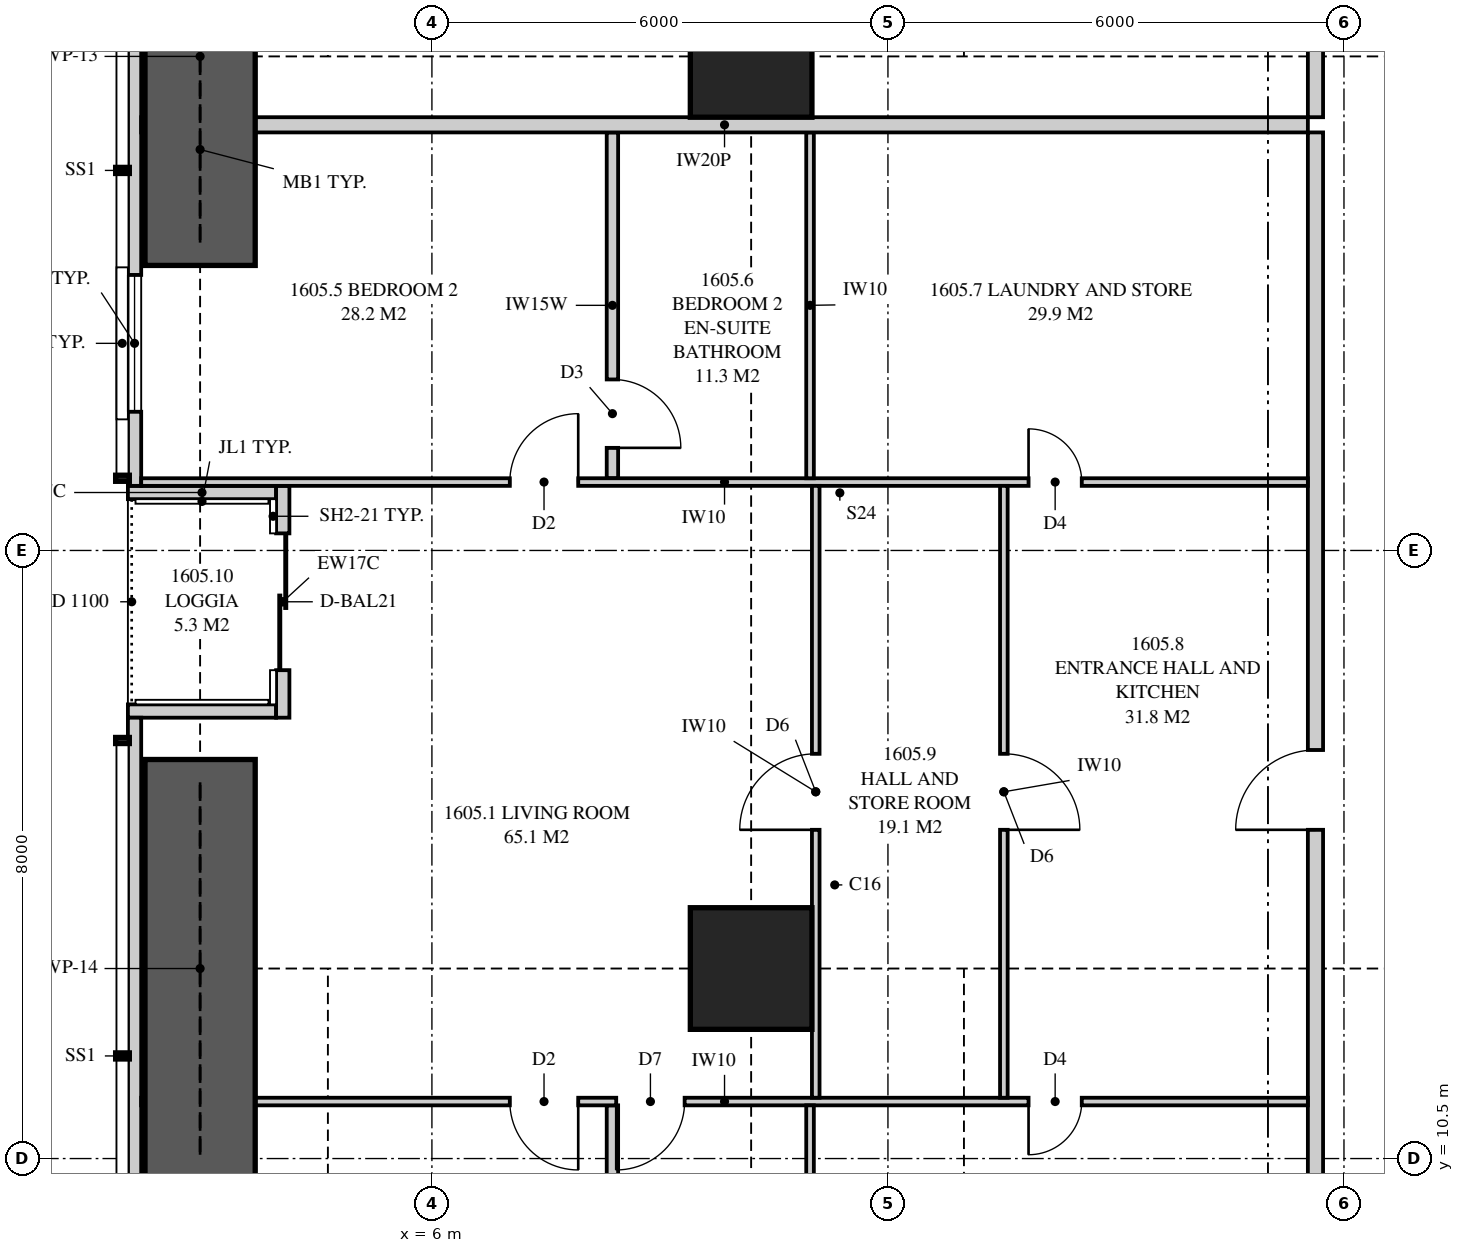
"""IFC4 building model, lengths in metres.
Left out: names, types, materials, properties, quantities, classifications, styles, units other than length and angle.
Written with IfcOpenShell. Run it as: python <this file> out.ifc"""

import sys

from ifc_helpers import new_model, si_unit, direction, frame, frame_2d, origin, origin_2d, place, context, subcontext, project, spatial, polyline, rectangle, outline, extrude, element, fill, save


model = new_model("IFC4")
c1 = context("Model", 3, precision=1e-05, world=origin(), true_north=direction((0.0, 1.0)))
c2 = subcontext(c1, "Body", "Model", "MODEL_VIEW")
j1 = project(units=[si_unit("LENGTHUNIT", "METRE"), si_unit("PLANEANGLEUNIT", "RADIAN")], contexts=[c1])
p1 = place(None, origin())
s1 = spatial("IfcSite", under=j1, at=p1, CompositionType="ELEMENT")
p2 = place(p1, origin())
s2 = spatial("IfcBuilding", under=s1, at=p2, CompositionType="ELEMENT")
p3 = place(p2, frame((0.0, 0.0, 61.2)))
s3 = spatial("IfcBuildingStorey", under=s2, at=p3, CompositionType="ELEMENT", Elevation=61.2)
for number, where, z_axis, x_axis in (
    (1, (10.2, 13.0, 0.0), (0.0, 0.0, 1.0), (1.0, 0.0, 0.0)),
    (2, (10.2, 25.0, 0.0), (0.0, 0.0, 1.0), (1.0, 0.0, 0.0)),
):
    element("IfcColumn", number, at=place(p3, frame(where, z_axis=z_axis, x_axis=x_axis)), inside=s3, PredefinedType="COLUMN", context=c2, shape_type="SweptSolid", body=[
        extrude(rectangle(XDim=1.6, YDim=1.6, at=origin_2d()), origin(), (0.0, 0.0, 1.0), 3.35),
    ])
p4 = place(p3, frame((2.087, 34.949, 0.0), z_axis=(0.0, 0.0, 1.0), x_axis=(0.0, -1.0, 0.0)))
e3 = element("IfcWall", 3, at=p4, inside=s3, PredefinedType="SOLIDWALL", context=c2, shape_type="SweptSolid", body=[
    extrude(outline(polyline([(0.0, 0.0), (15.599, 0.0), (15.599, 2.15), (9.949, 2.15), (9.949, 3.11), (9.823, 3.11), (9.823, 2.15), (9.73, 2.15), (9.73, 3.11), (0.0, 3.11), (0.0, 0.0)])), frame((0.0, 0.087, 0.0), z_axis=(0.0, -1.0, 0.0), x_axis=(1.0, 0.0, 0.0)), (0.0, 0.0, 1.0), 0.175),
])
p5 = place(p4, frame((2.722, 0.0, 0.4)))
e4 = element("IfcOpeningElement", 4, at=p5, cuts=e3, PredefinedType="OPENING", context=c2, shape_type="SweptSolid", body=[
    extrude(rectangle(XDim=1.8, YDim=1.7, at=frame_2d((0.9, 0.85))), frame((0.0, 0.097, 0.0), z_axis=(0.0, -1.0, 0.0), x_axis=(1.0, 0.0, 0.0)), (0.0, 0.0, 1.0), 0.195),
])
p6 = place(p4, frame((5.899, 0.0, 0.4)))
e5 = element("IfcOpeningElement", 5, at=p6, cuts=e3, PredefinedType="OPENING", context=c2, shape_type="SweptSolid", body=[
    extrude(rectangle(XDim=1.2, YDim=1.7, at=frame_2d((0.6, 0.85))), frame((0.0, 0.097, 0.0), z_axis=(0.0, -1.0, 0.0), x_axis=(1.0, 0.0, 0.0)), (0.0, 0.0, 1.0), 0.195),
])
p7 = place(p4, frame((12.824, 0.0, 0.4)))
e6 = element("IfcOpeningElement", 6, at=p7, cuts=e3, PredefinedType="OPENING", context=c2, shape_type="SweptSolid", body=[
    extrude(rectangle(XDim=1.8, YDim=1.7, at=frame_2d((0.9, 0.85))), frame((0.0, 0.097, 0.0), z_axis=(0.0, -1.0, 0.0), x_axis=(1.0, 0.0, 0.0)), (0.0, 0.0, 1.0), 0.195),
])
p8 = place(p3, frame((2.087, 16.3, 0.0), z_axis=(0.0, 0.0, 1.0), x_axis=(0.0, -1.0, 0.0)))
e7 = element("IfcWall", 7, at=p8, inside=s3, PredefinedType="SOLIDWALL", context=c2, shape_type="SweptSolid", body=[
    extrude(outline(polyline([(0.0, 0.0), (13.249, 0.0), (13.249, 3.11), (3.519, 3.11), (3.519, 2.15), (3.426, 2.15), (3.426, 3.11), (3.3, 3.11), (3.3, 2.15), (0.0, 2.15), (0.0, 0.0)])), frame((0.0, 0.087, 0.0), z_axis=(0.0, -1.0, 0.0), x_axis=(1.0, 0.0, 0.0)), (0.0, 0.0, 1.0), 0.175),
])
p9 = place(p8, frame((6.175, 0.0, 0.4)))
e8 = element("IfcOpeningElement", 8, at=p9, cuts=e7, PredefinedType="OPENING", context=c2, shape_type="SweptSolid", body=[
    extrude(rectangle(XDim=1.8, YDim=1.7, at=frame_2d((0.9, 0.85))), frame((0.0, 0.097, 0.0), z_axis=(0.0, -1.0, 0.0), x_axis=(1.0, 0.0, 0.0)), (0.0, 0.0, 1.0), 0.195),
])
p10 = place(p8, frame((9.227, 0.0, 0.4)))
e9 = element("IfcOpeningElement", 9, at=p10, cuts=e7, PredefinedType="OPENING", context=c2, shape_type="SweptSolid", body=[
    extrude(rectangle(XDim=1.8, YDim=1.7, at=frame_2d((0.9, 0.85))), frame((0.0, 0.097, 0.0), z_axis=(0.0, -1.0, 0.0), x_axis=(1.0, 0.0, 0.0)), (0.0, 0.0, 1.0), 0.195),
])
p11 = place(p3, frame((4.038, 19.35, 0.0), z_axis=(0.0, 0.0, 1.0), x_axis=(0.0, -1.0, 0.0)))
e10 = element("IfcWall", 10, at=p11, inside=s3, PredefinedType="SOLIDWALL", context=c2, shape_type="SweptSolid", body=[
    extrude(rectangle(XDim=3.05, YDim=0.175, at=frame_2d((1.525, 0.0))), origin(), (0.0, 0.0, 1.0), 3.11),
])
p12 = place(p11, frame((0.625, 0.0, 0.0)))
e11 = element("IfcOpeningElement", 11, at=p12, cuts=e10, PredefinedType="OPENING", context=c2, shape_type="SweptSolid", body=[
    extrude(rectangle(XDim=1.8, YDim=2.1, at=frame_2d((0.9, 1.05))), frame((0.0, 0.097, 0.0), z_axis=(0.0, -1.0, 0.0), x_axis=(1.0, 0.0, 0.0)), (0.0, 0.0, 1.0), 0.195),
])
for number, where, z_axis, x_axis in (
    (12, (2.0, 19.262, 0.0), (0.0, 0.0, 1.0), (1.0, 0.0, 0.0)),
    (13, (2.0, 16.387, 0.0), (0.0, 0.0, 1.0), (1.0, 0.0, 0.0)),
):
    element("IfcWall", number, at=place(p3, frame(where, z_axis=z_axis, x_axis=x_axis)), inside=s3, PredefinedType="SOLIDWALL", context=c2, shape_type="SweptSolid", body=[
        extrude(outline(polyline([(0.0, 0.0), (1.95, 0.0), (1.95, 3.11), (1.75, 3.11), (1.75, 2.15), (0.15, 2.15), (0.15, 3.11), (0.0, 3.11), (0.0, 0.0)])), frame((0.0, 0.087, 0.0), z_axis=(0.0, -1.0, 0.0), x_axis=(1.0, 0.0, 0.0)), (0.0, 0.0, 1.0), 0.175),
    ])
p13 = place(p3, frame((2.175, 24.1, 0.0), z_axis=(0.0, 0.0, 1.0), x_axis=(1.0, 0.0, 0.0)))
e14 = element("IfcWall", 14, at=p13, inside=s3, PredefinedType="PARTITIONING", context=c2, shape_type="SweptSolid", body=[
    extrude(outline(polyline([(0.529, 2.15), (0.0, 2.15), (0.0, 0.0), (0.529, 0.0), (0.529, 0.889), (1.021, 0.889), (1.021, 0.0), (15.35, 0.0), (15.35, 3.11), (9.335, 3.11), (9.335, 2.51), (6.715, 2.51), (6.715, 3.11), (1.685, 3.11), (1.685, 2.15), (1.021, 2.15), (1.021, 1.261), (0.529, 1.261), (0.529, 2.15)])), frame((0.0, 0.1, 0.0), z_axis=(0.0, -1.0, 0.0), x_axis=(1.0, 0.0, 0.0)), (0.0, 0.0, 1.0), 0.2),
])
p14 = place(p3, frame((17.625, 7.75, 0.0), z_axis=(0.0, 0.0, 1.0), x_axis=(0.0, 1.0, 0.0)))
e15 = element("IfcWall", 15, at=p14, inside=s3, PredefinedType="PARTITIONING", context=c2, shape_type="SweptSolid", body=[
    extrude(outline(polyline([(0.0, 0.0), (16.25, 0.0), (16.25, 3.11), (5.587, 3.11), (5.587, 2.541), (4.913, 2.541), (4.913, 3.11), (0.0, 3.11), (0.0, 0.0)])), frame((0.0, 0.1, 0.0), z_axis=(0.0, -1.0, 0.0), x_axis=(1.0, 0.0, 0.0)), (0.0, 0.0, 1.0), 0.2),
])
p15 = place(p14, frame((7.075, 0.0, 0.0)))
e16 = element("IfcOpeningElement", 16, at=p15, cuts=e15, PredefinedType="OPENING", context=c2, shape_type="SweptSolid", body=[
    extrude(rectangle(XDim=1.05, YDim=2.2, at=frame_2d((0.525, 1.1))), frame((0.0, 0.11, 0.0), z_axis=(0.0, -1.0, 0.0), x_axis=(1.0, 0.0, 0.0)), (0.0, 0.0, 1.0), 0.22),
])
p16 = place(p3, frame((2.175, 11.25, 0.0), z_axis=(0.0, 0.0, 1.0), x_axis=(1.0, 0.0, 0.0)))
e17 = element("IfcWall", 17, at=p16, inside=s3, PredefinedType="PARTITIONING", context=c2, shape_type="SweptSolid", body=[
    extrude(outline(polyline([(0.188, 3.11), (0.0, 3.11), (0.0, 0.0), (0.529, 0.0), (0.529, 0.273), (1.021, 0.273), (1.021, 0.0), (15.35, 0.0), (15.35, 3.11), (11.112, 3.11), (11.112, 2.541), (10.538, 2.541), (10.538, 3.11), (9.285, 3.11), (9.285, 2.51), (6.765, 2.51), (6.765, 3.11), (2.744, 3.11), (2.744, 2.541), (2.169, 2.541), (2.169, 3.11), (1.93, 3.11), (1.93, 2.15), (1.021, 2.15), (1.021, 1.876), (0.529, 1.876), (0.529, 2.15), (0.188, 2.15), (0.188, 3.11)])), frame((0.0, 0.05, 0.0), z_axis=(0.0, -1.0, 0.0), x_axis=(1.0, 0.0, 0.0)), (0.0, 0.0, 1.0), 0.1),
])
p17 = place(p16, frame((4.85, 0.0, 0.0)))
e18 = element("IfcOpeningElement", 18, at=p17, cuts=e17, PredefinedType="OPENING", context=c2, shape_type="SweptSolid", body=[
    extrude(rectangle(XDim=0.9, YDim=2.1, at=frame_2d((0.45, 1.05))), frame((0.0, 0.06, 0.0), z_axis=(0.0, -1.0, 0.0), x_axis=(1.0, 0.0, 0.0)), (0.0, 0.0, 1.0), 0.12),
])
p18 = place(p16, frame((6.25, 0.0, 0.0)))
e19 = element("IfcOpeningElement", 19, at=p18, cuts=e17, PredefinedType="OPENING", context=c2, shape_type="SweptSolid", body=[
    extrude(rectangle(XDim=0.9, YDim=2.1, at=frame_2d((0.45, 1.05))), frame((0.0, 0.06, 0.0), z_axis=(0.0, -1.0, 0.0), x_axis=(1.0, 0.0, 0.0)), (0.0, 0.0, 1.0), 0.12),
])
p19 = place(p16, frame((11.675, 0.0, 0.0)))
e20 = element("IfcOpeningElement", 20, at=p19, cuts=e17, PredefinedType="OPENING", context=c2, shape_type="SweptSolid", body=[
    extrude(rectangle(XDim=0.7, YDim=2.1, at=frame_2d((0.35, 1.05))), frame((0.0, 0.06, 0.0), z_axis=(0.0, -1.0, 0.0), x_axis=(1.0, 0.0, 0.0)), (0.0, 0.0, 1.0), 0.12),
])
p20 = place(p3, frame((2.175, 19.4, 0.0), z_axis=(0.0, 0.0, 1.0), x_axis=(1.0, 0.0, 0.0)))
e21 = element("IfcWall", 21, at=p20, inside=s3, PredefinedType="PARTITIONING", context=c2, shape_type="SweptSolid", body=[
    extrude(outline(polyline([(0.0, 0.0), (15.35, 0.0), (15.35, 3.11), (9.285, 3.11), (9.285, 2.51), (6.765, 2.51), (6.765, 3.11), (1.635, 3.11), (1.635, 2.15), (0.0, 2.15), (0.0, 3.11), (0.0, 0.0)])), frame((0.0, 0.05, 0.0), z_axis=(0.0, -1.0, 0.0), x_axis=(1.0, 0.0, 0.0)), (0.0, 0.0, 1.0), 0.1),
])
p21 = place(p20, frame((4.85, 0.0, 0.0)))
e22 = element("IfcOpeningElement", 22, at=p21, cuts=e21, PredefinedType="OPENING", context=c2, shape_type="SweptSolid", body=[
    extrude(rectangle(XDim=0.9, YDim=2.1, at=frame_2d((0.45, 1.05))), frame((0.0, 0.06, 0.0), z_axis=(0.0, -1.0, 0.0), x_axis=(1.0, 0.0, 0.0)), (0.0, 0.0, 1.0), 0.12),
])
p22 = place(p20, frame((11.675, 0.0, 0.0)))
e23 = element("IfcOpeningElement", 23, at=p22, cuts=e21, PredefinedType="OPENING", context=c2, shape_type="SweptSolid", body=[
    extrude(rectangle(XDim=0.7, YDim=2.1, at=frame_2d((0.35, 1.05))), frame((0.0, 0.06, 0.0), z_axis=(0.0, -1.0, 0.0), x_axis=(1.0, 0.0, 0.0)), (0.0, 0.0, 1.0), 0.12),
])
p23 = place(p3, frame((8.375, 7.75, 0.0), z_axis=(0.0, 0.0, 1.0), x_axis=(0.0, 1.0, 0.0)))
e24 = element("IfcWall", 24, at=p23, inside=s3, PredefinedType="PLUMBINGWALL", context=c2, shape_type="SweptSolid", body=[
    extrude(rectangle(XDim=3.45, YDim=0.15, at=frame_2d((1.725, 0.0))), origin(), (0.0, 0.0, 1.0), 3.11),
])
p24 = place(p3, frame((10.975, 7.75, 0.0), z_axis=(0.0, 0.0, 1.0), x_axis=(0.0, 1.0, 0.0)))
e25 = element("IfcWall", 25, at=p24, inside=s3, PredefinedType="PARTITIONING", context=c2, shape_type="SweptSolid", body=[
    extrude(outline(polyline([(0.0, 0.0), (3.45, 0.0), (3.45, 3.11), (3.45, 2.51), (0.0, 2.51), (0.0, 3.11), (0.0, 0.0)])), frame((0.0, 0.05, 0.0), z_axis=(0.0, -1.0, 0.0), x_axis=(1.0, 0.0, 0.0)), (0.0, 0.0, 1.0), 0.1),
])
p25 = place(p3, frame((8.375, 19.45, 0.0), z_axis=(0.0, 0.0, 1.0), x_axis=(0.0, 1.0, 0.0)))
e26 = element("IfcWall", 26, at=p25, inside=s3, PredefinedType="PLUMBINGWALL", context=c2, shape_type="SweptSolid", body=[
    extrude(rectangle(XDim=4.55, YDim=0.15, at=frame_2d((2.275, 0.0))), origin(), (0.0, 0.0, 1.0), 3.11),
])
p26 = place(p25, frame((0.4, 0.0, 0.0)))
e27 = element("IfcOpeningElement", 27, at=p26, cuts=e26, PredefinedType="OPENING", context=c2, shape_type="SweptSolid", body=[
    extrude(rectangle(XDim=0.9, YDim=2.1, at=frame_2d((0.45, 1.05))), frame((0.0, 0.085, 0.0), z_axis=(0.0, -1.0, 0.0), x_axis=(1.0, 0.0, 0.0)), (0.0, 0.0, 1.0), 0.17),
])
p27 = place(p3, frame((10.975, 19.45, 0.0), z_axis=(0.0, 0.0, 1.0), x_axis=(0.0, 1.0, 0.0)))
e28 = element("IfcWall", 28, at=p27, inside=s3, PredefinedType="PARTITIONING", context=c2, shape_type="SweptSolid", body=[
    extrude(outline(polyline([(0.0, 0.0), (4.55, 0.0), (4.55, 3.11), (4.55, 2.51), (0.0, 2.51), (0.0, 3.11), (0.0, 0.0)])), frame((0.0, 0.05, 0.0), z_axis=(0.0, -1.0, 0.0), x_axis=(1.0, 0.0, 0.0)), (0.0, 0.0, 1.0), 0.1),
])
p28 = place(p3, frame((13.525, 11.3, 0.0), z_axis=(0.0, 0.0, 1.0), x_axis=(0.0, 1.0, 0.0)))
e29 = element("IfcWall", 29, at=p28, inside=s3, PredefinedType="PARTITIONING", context=c2, shape_type="SweptSolid", body=[
    extrude(outline(polyline([(0.0, 0.0), (8.05, 0.0), (8.05, 3.11), (1.987, 3.11), (1.987, 2.541), (1.413, 2.541), (1.413, 3.11), (0.0, 3.11), (0.0, 0.0)])), frame((0.0, 0.05, 0.0), z_axis=(0.0, -1.0, 0.0), x_axis=(1.0, 0.0, 0.0)), (0.0, 0.0, 1.0), 0.1),
])
p29 = place(p28, frame((3.525, 0.0, 0.0)))
e30 = element("IfcOpeningElement", 30, at=p29, cuts=e29, PredefinedType="OPENING", context=c2, shape_type="SweptSolid", body=[
    extrude(rectangle(XDim=1.0, YDim=2.1, at=frame_2d((0.5, 1.05))), frame((0.0, 0.06, 0.0), z_axis=(0.0, -1.0, 0.0), x_axis=(1.0, 0.0, 0.0)), (0.0, 0.0, 1.0), 0.12),
])
p30 = place(p3, frame((11.05, 11.3, 0.0), z_axis=(0.0, 0.0, 1.0), x_axis=(0.0, 1.0, 0.0)))
e31 = element("IfcWall", 31, at=p30, inside=s3, PredefinedType="PARTITIONING", context=c2, shape_type="SweptSolid", body=[
    extrude(rectangle(XDim=8.05, YDim=0.1, at=frame_2d((4.025, 0.0))), origin(), (0.0, 0.0, 1.0), 2.51),
])
p31 = place(p30, frame((3.525, 0.0, 0.0)))
e32 = element("IfcOpeningElement", 32, at=p31, cuts=e31, PredefinedType="OPENING", context=c2, shape_type="SweptSolid", body=[
    extrude(rectangle(XDim=1.0, YDim=2.1, at=frame_2d((0.5, 1.05))), frame((0.0, 0.06, 0.0), z_axis=(0.0, -1.0, 0.0), x_axis=(1.0, 0.0, 0.0)), (0.0, 0.0, 1.0), 0.12),
])
p32 = place(p3, frame((17.625, 24.2, 0.0), z_axis=(0.0, 0.0, 1.0), x_axis=(0.0, 1.0, 0.0)))
e33 = element("IfcWall", 33, at=p32, inside=s3, PredefinedType="PARTITIONING", context=c2, shape_type="SweptSolid", body=[
    extrude(outline(polyline([(0.0, 0.0), (5.05, 0.0), (5.05, 3.11), (1.137, 3.11), (1.137, 2.541), (0.463, 2.541), (0.463, 3.11), (0.0, 3.11), (0.0, 0.0)])), frame((0.0, 0.1, 0.0), z_axis=(0.0, -1.0, 0.0), x_axis=(1.0, 0.0, 0.0)), (0.0, 0.0, 1.0), 0.2),
])
p33 = place(p32, frame((1.075, 0.0, 0.0)))
e34 = element("IfcOpeningElement", 34, at=p33, cuts=e33, PredefinedType="OPENING", context=c2, shape_type="SweptSolid", body=[
    extrude(rectangle(XDim=1.8, YDim=2.1, at=frame_2d((0.9, 1.05))), frame((0.0, 0.11, 0.0), z_axis=(0.0, -1.0, 0.0), x_axis=(1.0, 0.0, 0.0)), (0.0, 0.0, 1.0), 0.22),
])
for number, where, z_axis, x_axis in (
    (35, (2.95, 22.25, 0.0), (0.0, 0.0, 1.0), (0.0, 1.0, 0.0)),
    (36, (2.95, 10.25, 0.0), (0.0, 0.0, 1.0), (0.0, 1.0, 0.0)),
):
    element("IfcWall", number, at=place(p3, frame(where, z_axis=z_axis, x_axis=x_axis)), inside=s3, PredefinedType="SHEAR", context=c2, shape_type="SweptSolid", body=[
        extrude(rectangle(XDim=5.5, YDim=1.45, at=frame_2d((2.75, 0.0))), origin(), (0.0, 0.0, 1.0), 3.35),
    ])
p34 = place(p7, origin())
e37 = element("IfcWindow", 37, at=p34, inside=s3, PartitioningType="SINGLE_PANEL", PredefinedType="WINDOW", context=c2, shape_type="SweptSolid", body=[
    extrude(rectangle(XDim=1.8, YDim=1.7, at=frame_2d((0.9, 0.85))), frame((0.0, 0.03, 0.0), z_axis=(0.0, -1.0, 0.0), x_axis=(1.0, 0.0, 0.0)), (0.0, 0.0, 1.0), 0.06),
])
fill(e6, e37)
p35 = place(p12, origin())
e38 = element("IfcDoor", 38, at=p35, inside=s3, OperationType="SLIDING_TO_LEFT", PredefinedType="DOOR", context=c2, shape_type="SweptSolid", body=[
    extrude(rectangle(XDim=1.8, YDim=2.1, at=frame_2d((0.9, 1.05))), frame((0.0, 0.025, 0.0), z_axis=(0.0, -1.0, 0.0), x_axis=(1.0, 0.0, 0.0)), (0.0, 0.0, 1.0), 0.05),
])
fill(e11, e38)
p36 = place(p15, origin())
e39 = element("IfcDoor", 39, at=p36, inside=s3, OperationType="SINGLE_SWING_LEFT", PredefinedType="DOOR", context=c2, shape_type="SweptSolid", body=[
    extrude(rectangle(XDim=1.05, YDim=2.2, at=frame_2d((0.525, 1.1))), frame((0.0, 0.025, 0.0), z_axis=(0.0, -1.0, 0.0), x_axis=(1.0, 0.0, 0.0)), (0.0, 0.0, 1.0), 0.05),
])
fill(e16, e39)
p37 = place(p17, frame((0.9, 0.0, 0.0), z_axis=(0.0, 0.0, 1.0), x_axis=(-1.0, 0.0, 0.0)))
e40 = element("IfcDoor", 40, at=p37, inside=s3, OperationType="SINGLE_SWING_LEFT", PredefinedType="DOOR", context=c2, shape_type="SweptSolid", body=[
    extrude(rectangle(XDim=0.9, YDim=2.1, at=frame_2d((0.45, 1.05))), frame((0.0, 0.025, 0.0), z_axis=(0.0, -1.0, 0.0), x_axis=(1.0, 0.0, 0.0)), (0.0, 0.0, 1.0), 0.05),
])
fill(e18, e40)
p38 = place(p18, frame((0.9, 0.0, 0.0), z_axis=(0.0, 0.0, 1.0), x_axis=(-1.0, 0.0, 0.0)))
e41 = element("IfcDoor", 41, at=p38, inside=s3, OperationType="SINGLE_SWING_RIGHT", PredefinedType="DOOR", context=c2, shape_type="SweptSolid", body=[
    extrude(rectangle(XDim=0.9, YDim=2.1, at=frame_2d((0.45, 1.05))), frame((0.0, 0.025, 0.0), z_axis=(0.0, -1.0, 0.0), x_axis=(1.0, 0.0, 0.0)), (0.0, 0.0, 1.0), 0.05),
])
fill(e19, e41)
p39 = place(p19, frame((0.7, 0.0, 0.0), z_axis=(0.0, 0.0, 1.0), x_axis=(-1.0, 0.0, 0.0)))
e42 = element("IfcDoor", 42, at=p39, inside=s3, OperationType="SINGLE_SWING_RIGHT", PredefinedType="DOOR", context=c2, shape_type="SweptSolid", body=[
    extrude(rectangle(XDim=0.7, YDim=2.1, at=frame_2d((0.35, 1.05))), frame((0.0, 0.025, 0.0), z_axis=(0.0, -1.0, 0.0), x_axis=(1.0, 0.0, 0.0)), (0.0, 0.0, 1.0), 0.05),
])
fill(e20, e42)
p40 = place(p21, origin())
e43 = element("IfcDoor", 43, at=p40, inside=s3, OperationType="SINGLE_SWING_RIGHT", PredefinedType="DOOR", context=c2, shape_type="SweptSolid", body=[
    extrude(rectangle(XDim=0.9, YDim=2.1, at=frame_2d((0.45, 1.05))), frame((0.0, 0.025, 0.0), z_axis=(0.0, -1.0, 0.0), x_axis=(1.0, 0.0, 0.0)), (0.0, 0.0, 1.0), 0.05),
])
fill(e22, e43)
p41 = place(p26, frame((0.9, 0.0, 0.0), z_axis=(0.0, 0.0, 1.0), x_axis=(-1.0, 0.0, 0.0)))
e44 = element("IfcDoor", 44, at=p41, inside=s3, OperationType="SINGLE_SWING_RIGHT", PredefinedType="DOOR", context=c2, shape_type="SweptSolid", body=[
    extrude(rectangle(XDim=0.9, YDim=2.1, at=frame_2d((0.45, 1.05))), frame((0.0, 0.025, 0.0), z_axis=(0.0, -1.0, 0.0), x_axis=(1.0, 0.0, 0.0)), (0.0, 0.0, 1.0), 0.05),
])
fill(e27, e44)
p42 = place(p22, origin())
e45 = element("IfcDoor", 45, at=p42, inside=s3, OperationType="SINGLE_SWING_LEFT", PredefinedType="DOOR", context=c2, shape_type="SweptSolid", body=[
    extrude(rectangle(XDim=0.7, YDim=2.1, at=frame_2d((0.35, 1.05))), frame((0.0, 0.025, 0.0), z_axis=(0.0, -1.0, 0.0), x_axis=(1.0, 0.0, 0.0)), (0.0, 0.0, 1.0), 0.05),
])
fill(e23, e45)
p43 = place(p29, frame((1.0, 0.0, 0.0), z_axis=(0.0, 0.0, 1.0), x_axis=(-1.0, 0.0, 0.0)))
e46 = element("IfcDoor", 46, at=p43, inside=s3, OperationType="SINGLE_SWING_RIGHT", PredefinedType="DOOR", context=c2, shape_type="SweptSolid", body=[
    extrude(rectangle(XDim=1.0, YDim=2.1, at=frame_2d((0.5, 1.05))), frame((0.0, 0.025, 0.0), z_axis=(0.0, -1.0, 0.0), x_axis=(1.0, 0.0, 0.0)), (0.0, 0.0, 1.0), 0.05),
])
fill(e30, e46)
p44 = place(p31, origin())
e47 = element("IfcDoor", 47, at=p44, inside=s3, OperationType="SINGLE_SWING_LEFT", PredefinedType="DOOR", context=c2, shape_type="SweptSolid", body=[
    extrude(rectangle(XDim=1.0, YDim=2.1, at=frame_2d((0.5, 1.05))), frame((0.0, 0.025, 0.0), z_axis=(0.0, -1.0, 0.0), x_axis=(1.0, 0.0, 0.0)), (0.0, 0.0, 1.0), 0.05),
])
fill(e32, e47)
save(model, sys.argv[1])
